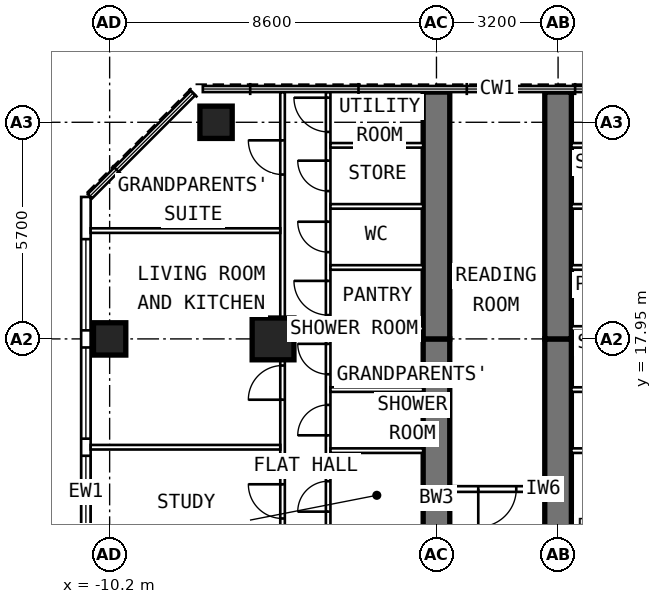
"""IFC4 building model, lengths in metres.
Left out: names, types, materials, properties, quantities, classifications, styles, units other than length and angle.
Written with IfcOpenShell. Run it as: python <this file> out.ifc"""

import sys

from ifc_helpers import new_model, si_unit, direction, frame, frame_2d, origin, origin_2d, place, context, subcontext, project, spatial, rectangle, extrude, element, fill, save


model = new_model("IFC4")
c1 = context("Model", 3, precision=1e-05, world=origin(), true_north=direction((0.0, 1.0)))
c2 = subcontext(c1, "Body", "Model", "MODEL_VIEW")
j1 = project(units=[si_unit("LENGTHUNIT", "METRE"), si_unit("PLANEANGLEUNIT", "RADIAN")], contexts=[c1])
p1 = place(None, origin())
s1 = spatial("IfcSite", under=j1, at=p1, CompositionType="ELEMENT")
p2 = place(p1, origin())
s2 = spatial("IfcBuilding", under=s1, at=p2, CompositionType="ELEMENT")
p3 = place(p2, frame((0.0, 0.0, 235.2)))
s3 = spatial("IfcBuildingStorey", under=s2, at=p3, CompositionType="ELEMENT", Elevation=235.2)
for number, where, z_axis, x_axis in (
    (1, (-10.2, 17.95, 0.0), (0.0, 0.0, 1.0), (0.0, 1.0, 0.0)),
    (2, (-7.4, 23.65, 0.0), (0.0, 0.0, 1.0), (0.0, 1.0, 0.0)),
):
    element("IfcColumn", number, at=place(p3, frame(where, z_axis=z_axis, x_axis=x_axis)), inside=s3, PredefinedType="COLUMN", context=c2, shape_type="SweptSolid", body=[
        extrude(rectangle(XDim=0.85, YDim=0.85, at=origin_2d()), origin(), (0.0, 0.0, 1.0), 3.6),
    ])
p4 = place(p3, frame((-5.9, 17.95, 0.0), z_axis=(0.0, 0.0, 1.0), x_axis=(0.0, 1.0, 0.0)))
e3 = element("IfcColumn", 3, at=p4, inside=s3, PredefinedType="COLUMN", context=c2, shape_type="SweptSolid", body=[
    extrude(rectangle(XDim=1.1, YDim=1.1, at=origin_2d()), origin(), (0.0, 0.0, 1.0), 3.6),
])
p5 = place(p3, frame((-1.6, 9.6, 0.0), z_axis=(0.0, 0.0, 1.0), x_axis=(0.0, 1.0, 0.0)))
e4 = element("IfcWall", 4, at=p5, inside=s3, PredefinedType="SHEAR", context=c2, shape_type="SweptSolid", body=[
    extrude(rectangle(XDim=8.35, YDim=0.7, at=frame_2d((4.175, 0.0))), origin(), (0.0, 0.0, 1.0), 3.6),
])
p6 = place(p5, frame((1.3, 0.0, 0.0)))
e5 = element("IfcOpeningElement", 5, at=p6, cuts=e4, PredefinedType="OPENING", context=c2, shape_type="SweptSolid", body=[
    extrude(rectangle(XDim=1.0, YDim=2.1, at=frame_2d((0.5, 1.05))), frame((0.0, 0.362, 0.0), z_axis=(0.0, -1.0, 0.0), x_axis=(1.0, 0.0, 0.0)), (0.0, 0.0, 1.0), 0.724),
])
p7 = place(p3, frame((-1.6, 17.95, 0.0), z_axis=(0.0, 0.0, 1.0), x_axis=(0.0, 1.0, 0.0)))
e6 = element("IfcWall", 6, at=p7, inside=s3, PredefinedType="SHEAR", context=c2, shape_type="SweptSolid", body=[
    extrude(rectangle(XDim=6.495, YDim=0.7, at=frame_2d((3.248, 0.0))), origin(), (0.0, 0.0, 1.0), 3.6),
])
p8 = place(p3, frame((1.6, 9.6, 0.0), z_axis=(0.0, 0.0, 1.0), x_axis=(0.0, 1.0, 0.0)))
e7 = element("IfcWall", 7, at=p8, inside=s3, PredefinedType="SHEAR", context=c2, shape_type="SweptSolid", body=[
    extrude(rectangle(XDim=8.35, YDim=0.7, at=frame_2d((4.175, 0.0))), origin(), (0.0, 0.0, 1.0), 3.6),
])
p9 = place(p8, frame((1.3, 0.0, 0.0)))
e8 = element("IfcOpeningElement", 8, at=p9, cuts=e7, PredefinedType="OPENING", context=c2, shape_type="SweptSolid", body=[
    extrude(rectangle(XDim=1.0, YDim=2.1, at=frame_2d((0.5, 1.05))), frame((0.0, 0.362, 0.0), z_axis=(0.0, -1.0, 0.0), x_axis=(1.0, 0.0, 0.0)), (0.0, 0.0, 1.0), 0.724),
])
p10 = place(p3, frame((1.6, 17.95, 0.0), z_axis=(0.0, 0.0, 1.0), x_axis=(0.0, 1.0, 0.0)))
e9 = element("IfcWall", 9, at=p10, inside=s3, PredefinedType="SHEAR", context=c2, shape_type="SweptSolid", body=[
    extrude(rectangle(XDim=6.495, YDim=0.7, at=frame_2d((3.248, 0.0))), origin(), (0.0, 0.0, 1.0), 3.6),
])
p11 = place(p3, frame((-10.825, 6.148, 0.0), z_axis=(0.0, 0.0, 1.0), x_axis=(0.0, 1.0, 0.0)))
e10 = element("IfcWall", 10, at=p11, inside=s3, PredefinedType="SOLIDWALL", context=c2, shape_type="SweptSolid", body=[
    extrude(rectangle(XDim=15.537, YDim=0.25, at=frame_2d((7.769, 0.0))), origin(), (0.0, 0.0, 1.0), 3.35),
])
p12 = place(p11, frame((0.627, 0.0, 0.8)))
e11 = element("IfcOpeningElement", 11, at=p12, cuts=e10, PredefinedType="OPENING", context=c2, shape_type="SweptSolid", body=[
    extrude(rectangle(XDim=2.4, YDim=1.8, at=frame_2d((1.2, 0.9))), frame((0.0, 0.137, 0.0), z_axis=(0.0, -1.0, 0.0), x_axis=(1.0, 0.0, 0.0)), (0.0, 0.0, 1.0), 0.274),
])
p13 = place(p11, frame((3.477, 0.0, 0.8)))
e12 = element("IfcOpeningElement", 12, at=p13, cuts=e10, PredefinedType="OPENING", context=c2, shape_type="SweptSolid", body=[
    extrude(rectangle(XDim=2.4, YDim=1.8, at=frame_2d((1.2, 0.9))), frame((0.0, 0.137, 0.0), z_axis=(0.0, -1.0, 0.0), x_axis=(1.0, 0.0, 0.0)), (0.0, 0.0, 1.0), 0.274),
])
p14 = place(p11, frame((6.327, 0.0, 0.8)))
e13 = element("IfcOpeningElement", 13, at=p14, cuts=e10, PredefinedType="OPENING", context=c2, shape_type="SweptSolid", body=[
    extrude(rectangle(XDim=2.4, YDim=1.8, at=frame_2d((1.2, 0.9))), frame((0.0, 0.137, 0.0), z_axis=(0.0, -1.0, 0.0), x_axis=(1.0, 0.0, 0.0)), (0.0, 0.0, 1.0), 0.274),
])
p15 = place(p11, frame((9.177, 0.0, 0.8)))
e14 = element("IfcOpeningElement", 14, at=p15, cuts=e10, PredefinedType="OPENING", context=c2, shape_type="SweptSolid", body=[
    extrude(rectangle(XDim=2.4, YDim=1.8, at=frame_2d((1.2, 0.9))), frame((0.0, 0.137, 0.0), z_axis=(0.0, -1.0, 0.0), x_axis=(1.0, 0.0, 0.0)), (0.0, 0.0, 1.0), 0.274),
])
p16 = place(p11, frame((12.027, 0.0, 0.8)))
e15 = element("IfcOpeningElement", 15, at=p16, cuts=e10, PredefinedType="OPENING", context=c2, shape_type="SweptSolid", body=[
    extrude(rectangle(XDim=2.4, YDim=1.8, at=frame_2d((1.2, 0.9))), frame((0.0, 0.137, 0.0), z_axis=(0.0, -1.0, 0.0), x_axis=(1.0, 0.0, 0.0)), (0.0, 0.0, 1.0), 0.274),
])
p17 = place(p3, frame((-4.45, 9.9, 0.0), z_axis=(0.0, 0.0, 1.0), x_axis=(0.0, 1.0, 0.0)))
e16 = element("IfcWall", 16, at=p17, inside=s3, PredefinedType="PARTITIONING", context=c2, shape_type="SweptSolid", body=[
    extrude(rectangle(XDim=14.545, YDim=0.12, at=frame_2d((7.272, 0.0))), origin(), (0.0, 0.0, 1.0), 3.35),
])
p18 = place(p17, frame((0.95, 0.0, 0.0)))
e17 = element("IfcOpeningElement", 17, at=p18, cuts=e16, PredefinedType="OPENING", context=c2, shape_type="SweptSolid", body=[
    extrude(rectangle(XDim=0.9, YDim=2.1, at=frame_2d((0.45, 1.05))), frame((0.0, 0.072, 0.0), z_axis=(0.0, -1.0, 0.0), x_axis=(1.0, 0.0, 0.0)), (0.0, 0.0, 1.0), 0.144),
])
p19 = place(p17, frame((3.505, 0.0, 0.0)))
e18 = element("IfcOpeningElement", 18, at=p19, cuts=e16, PredefinedType="OPENING", context=c2, shape_type="SweptSolid", body=[
    extrude(rectangle(XDim=0.8, YDim=2.1, at=frame_2d((0.4, 1.05))), frame((0.0, 0.072, 0.0), z_axis=(0.0, -1.0, 0.0), x_axis=(1.0, 0.0, 0.0)), (0.0, 0.0, 1.0), 0.144),
])
p20 = place(p17, frame((5.513, 0.0, 0.0)))
e19 = element("IfcOpeningElement", 19, at=p20, cuts=e16, PredefinedType="OPENING", context=c2, shape_type="SweptSolid", body=[
    extrude(rectangle(XDim=0.8, YDim=2.1, at=frame_2d((0.4, 1.05))), frame((0.0, 0.072, 0.0), z_axis=(0.0, -1.0, 0.0), x_axis=(1.0, 0.0, 0.0)), (0.0, 0.0, 1.0), 0.144),
])
p21 = place(p17, frame((7.12, 0.0, 0.0)))
e20 = element("IfcOpeningElement", 20, at=p21, cuts=e16, PredefinedType="OPENING", context=c2, shape_type="SweptSolid", body=[
    extrude(rectangle(XDim=0.8, YDim=2.1, at=frame_2d((0.4, 1.05))), frame((0.0, 0.072, 0.0), z_axis=(0.0, -1.0, 0.0), x_axis=(1.0, 0.0, 0.0)), (0.0, 0.0, 1.0), 0.144),
])
p22 = place(p17, frame((8.677, 0.0, 0.0)))
e21 = element("IfcOpeningElement", 21, at=p22, cuts=e16, PredefinedType="OPENING", context=c2, shape_type="SweptSolid", body=[
    extrude(rectangle(XDim=0.9, YDim=2.1, at=frame_2d((0.45, 1.05))), frame((0.0, 0.072, 0.0), z_axis=(0.0, -1.0, 0.0), x_axis=(1.0, 0.0, 0.0)), (0.0, 0.0, 1.0), 0.144),
])
p23 = place(p17, frame((10.333, 0.0, 0.0)))
e22 = element("IfcOpeningElement", 22, at=p23, cuts=e16, PredefinedType="OPENING", context=c2, shape_type="SweptSolid", body=[
    extrude(rectangle(XDim=0.8, YDim=2.1, at=frame_2d((0.4, 1.05))), frame((0.0, 0.072, 0.0), z_axis=(0.0, -1.0, 0.0), x_axis=(1.0, 0.0, 0.0)), (0.0, 0.0, 1.0), 0.144),
])
p24 = place(p17, frame((11.94, 0.0, 0.0)))
e23 = element("IfcOpeningElement", 23, at=p24, cuts=e16, PredefinedType="OPENING", context=c2, shape_type="SweptSolid", body=[
    extrude(rectangle(XDim=0.8, YDim=2.1, at=frame_2d((0.4, 1.05))), frame((0.0, 0.072, 0.0), z_axis=(0.0, -1.0, 0.0), x_axis=(1.0, 0.0, 0.0)), (0.0, 0.0, 1.0), 0.144),
])
p25 = place(p17, frame((13.497, 0.0, 0.0)))
e24 = element("IfcOpeningElement", 24, at=p25, cuts=e16, PredefinedType="OPENING", context=c2, shape_type="SweptSolid", body=[
    extrude(rectangle(XDim=0.9, YDim=2.1, at=frame_2d((0.45, 1.05))), frame((0.0, 0.072, 0.0), z_axis=(0.0, -1.0, 0.0), x_axis=(1.0, 0.0, 0.0)), (0.0, 0.0, 1.0), 0.144),
])
p26 = place(p3, frame((-5.65, 9.6, 0.0), z_axis=(0.0, 0.0, 1.0), x_axis=(0.0, 1.0, 0.0)))
e25 = element("IfcWall", 25, at=p26, inside=s3, PredefinedType="PARTITIONING", context=c2, shape_type="SweptSolid", body=[
    extrude(rectangle(XDim=14.845, YDim=0.12, at=frame_2d((7.422, 0.0))), origin(), (0.0, 0.0, 1.0), 3.35),
])
p27 = place(p26, frame((1.05, 0.0, 0.0)))
e26 = element("IfcOpeningElement", 26, at=p27, cuts=e25, PredefinedType="OPENING", context=c2, shape_type="SweptSolid", body=[
    extrude(rectangle(XDim=0.9, YDim=2.1, at=frame_2d((0.45, 1.05))), frame((0.0, 0.072, 0.0), z_axis=(0.0, -1.0, 0.0), x_axis=(1.0, 0.0, 0.0)), (0.0, 0.0, 1.0), 0.144),
])
p28 = place(p26, frame((3.625, 0.0, 0.0)))
e27 = element("IfcOpeningElement", 27, at=p28, cuts=e25, PredefinedType="OPENING", context=c2, shape_type="SweptSolid", body=[
    extrude(rectangle(XDim=0.9, YDim=2.1, at=frame_2d((0.45, 1.05))), frame((0.0, 0.072, 0.0), z_axis=(0.0, -1.0, 0.0), x_axis=(1.0, 0.0, 0.0)), (0.0, 0.0, 1.0), 0.144),
])
p29 = place(p26, frame((6.75, 0.0, 0.0)))
e28 = element("IfcOpeningElement", 28, at=p29, cuts=e25, PredefinedType="OPENING", context=c2, shape_type="SweptSolid", body=[
    extrude(rectangle(XDim=0.9, YDim=2.1, at=frame_2d((0.45, 1.05))), frame((0.0, 0.072, 0.0), z_axis=(0.0, -1.0, 0.0), x_axis=(1.0, 0.0, 0.0)), (0.0, 0.0, 1.0), 0.144),
])
p30 = place(p26, frame((12.675, 0.0, 0.0)))
e29 = element("IfcOpeningElement", 29, at=p30, cuts=e25, PredefinedType="OPENING", context=c2, shape_type="SweptSolid", body=[
    extrude(rectangle(XDim=0.9, YDim=2.1, at=frame_2d((0.45, 1.05))), frame((0.0, 0.072, 0.0), z_axis=(0.0, -1.0, 0.0), x_axis=(1.0, 0.0, 0.0)), (0.0, 0.0, 1.0), 0.144),
])
for number, where, z_axis, x_axis in (
    (30, (-5.71, 15.1, 0.0), (0.0, 0.0, 1.0), (-1.0, 0.0, 0.0)),
    (31, (-5.71, 20.8, 0.0), (0.0, 0.0, 1.0), (-1.0, 0.0, 0.0)),
):
    element("IfcWall", number, at=place(p3, frame(where, z_axis=z_axis, x_axis=x_axis)), inside=s3, PredefinedType="PARTITIONING", context=c2, shape_type="SweptSolid", body=[
        extrude(rectangle(XDim=4.99, YDim=0.12, at=frame_2d((2.495, 0.0))), origin(), (0.0, 0.0, 1.0), 3.35),
    ])
for number, where, z_axis, x_axis in (
    (32, (-1.95, 15.01, 0.0), (0.0, 0.0, 1.0), (-1.0, 0.0, 0.0)),
    (33, (-1.95, 16.617, 0.0), (0.0, 0.0, 1.0), (-1.0, 0.0, 0.0)),
):
    element("IfcWall", number, at=place(p3, frame(where, z_axis=z_axis, x_axis=x_axis)), inside=s3, PredefinedType="PARTITIONING", context=c2, shape_type="SweptSolid", body=[
        extrude(rectangle(XDim=2.44, YDim=0.12, at=frame_2d((1.22, 0.0))), origin(), (0.0, 0.0, 1.0), 3.35),
    ])
p31 = place(p3, frame((-1.95, 18.223, 0.0), z_axis=(0.0, 0.0, 1.0), x_axis=(-1.0, 0.0, 0.0)))
e34 = element("IfcWall", 34, at=p31, inside=s3, PredefinedType="PARTITIONING", context=c2, shape_type="SweptSolid", body=[
    extrude(rectangle(XDim=2.44, YDim=0.12, at=frame_2d((1.22, 0.0))), origin(), (0.0, 0.0, 1.0), 2.45),
])
for number, where, z_axis, x_axis in (
    (35, (-1.95, 19.83, 0.0), (0.0, 0.0, 1.0), (-1.0, 0.0, 0.0)),
    (36, (-1.95, 21.437, 0.0), (0.0, 0.0, 1.0), (-1.0, 0.0, 0.0)),
    (37, (-1.95, 23.043, 0.0), (0.0, 0.0, 1.0), (-1.0, 0.0, 0.0)),
    (38, (1.95, 15.01, 0.0), (0.0, 0.0, 1.0), (1.0, 0.0, 0.0)),
    (39, (1.95, 16.617, 0.0), (0.0, 0.0, 1.0), (1.0, 0.0, 0.0)),
):
    element("IfcWall", number, at=place(p3, frame(where, z_axis=z_axis, x_axis=x_axis)), inside=s3, PredefinedType="PARTITIONING", context=c2, shape_type="SweptSolid", body=[
        extrude(rectangle(XDim=2.44, YDim=0.12, at=frame_2d((1.22, 0.0))), origin(), (0.0, 0.0, 1.0), 3.35),
    ])
p32 = place(p3, frame((1.95, 18.223, 0.0), z_axis=(0.0, 0.0, 1.0), x_axis=(1.0, 0.0, 0.0)))
e40 = element("IfcWall", 40, at=p32, inside=s3, PredefinedType="PARTITIONING", context=c2, shape_type="SweptSolid", body=[
    extrude(rectangle(XDim=2.44, YDim=0.12, at=frame_2d((1.22, 0.0))), origin(), (0.0, 0.0, 1.0), 2.45),
])
for number, where, z_axis, x_axis in (
    (41, (1.95, 19.83, 0.0), (0.0, 0.0, 1.0), (1.0, 0.0, 0.0)),
    (42, (1.95, 21.437, 0.0), (0.0, 0.0, 1.0), (1.0, 0.0, 0.0)),
    (43, (1.95, 23.043, 0.0), (0.0, 0.0, 1.0), (1.0, 0.0, 0.0)),
):
    element("IfcWall", number, at=place(p3, frame(where, z_axis=z_axis, x_axis=x_axis)), inside=s3, PredefinedType="PARTITIONING", context=c2, shape_type="SweptSolid", body=[
        extrude(rectangle(XDim=2.44, YDim=0.12, at=frame_2d((1.22, 0.0))), origin(), (0.0, 0.0, 1.0), 3.35),
    ])
p33 = place(p3, frame((1.25, 14.0, 0.0), z_axis=(0.0, 0.0, 1.0), x_axis=(-1.0, 0.0, 0.0)))
e44 = element("IfcWall", 44, at=p33, inside=s3, PredefinedType="PARTITIONING", context=c2, shape_type="SweptSolid", body=[
    extrude(rectangle(XDim=2.5, YDim=0.15, at=frame_2d((1.25, 0.0))), origin(), (0.0, 0.0, 1.0), 3.35),
])
p34 = place(p33, frame((0.75, 0.0, 0.0)))
e45 = element("IfcOpeningElement", 45, at=p34, cuts=e44, PredefinedType="OPENING", context=c2, shape_type="SweptSolid", body=[
    extrude(rectangle(XDim=1.0, YDim=2.1, at=frame_2d((0.5, 1.05))), frame((0.0, 0.087, 0.0), z_axis=(0.0, -1.0, 0.0), x_axis=(1.0, 0.0, 0.0)), (0.0, 0.0, 1.0), 0.174),
])
p35 = place(p14, origin())
e46 = element("IfcWindow", 46, at=p35, inside=s3, PartitioningType="SINGLE_PANEL", PredefinedType="WINDOW", context=c2, shape_type="SweptSolid", body=[
    extrude(rectangle(XDim=2.4, YDim=1.8, at=frame_2d((1.2, 0.9))), frame((0.0, 0.03, 0.0), z_axis=(0.0, -1.0, 0.0), x_axis=(1.0, 0.0, 0.0)), (0.0, 0.0, 1.0), 0.06),
])
fill(e13, e46)
p36 = place(p15, origin())
e47 = element("IfcWindow", 47, at=p36, inside=s3, PartitioningType="SINGLE_PANEL", PredefinedType="WINDOW", context=c2, shape_type="SweptSolid", body=[
    extrude(rectangle(XDim=2.4, YDim=1.8, at=frame_2d((1.2, 0.9))), frame((0.0, 0.03, 0.0), z_axis=(0.0, -1.0, 0.0), x_axis=(1.0, 0.0, 0.0)), (0.0, 0.0, 1.0), 0.06),
])
fill(e14, e47)
p37 = place(p16, origin())
e48 = element("IfcWindow", 48, at=p37, inside=s3, PartitioningType="SINGLE_PANEL", PredefinedType="WINDOW", context=c2, shape_type="SweptSolid", body=[
    extrude(rectangle(XDim=2.4, YDim=1.8, at=frame_2d((1.2, 0.9))), frame((0.0, 0.03, 0.0), z_axis=(0.0, -1.0, 0.0), x_axis=(1.0, 0.0, 0.0)), (0.0, 0.0, 1.0), 0.06),
])
fill(e15, e48)
p38 = place(p28, origin())
e49 = element("IfcDoor", 49, at=p38, inside=s3, OperationType="SINGLE_SWING_RIGHT", PredefinedType="DOOR", context=c2, shape_type="SweptSolid", body=[
    extrude(rectangle(XDim=0.9, YDim=2.1, at=frame_2d((0.45, 1.05))), frame((0.0, 0.025, 0.0), z_axis=(0.0, -1.0, 0.0), x_axis=(1.0, 0.0, 0.0)), (0.0, 0.0, 1.0), 0.05),
])
fill(e27, e49)
p39 = place(p29, origin())
e50 = element("IfcDoor", 50, at=p39, inside=s3, OperationType="SINGLE_SWING_LEFT", PredefinedType="DOOR", context=c2, shape_type="SweptSolid", body=[
    extrude(rectangle(XDim=0.9, YDim=2.1, at=frame_2d((0.45, 1.05))), frame((0.0, 0.025, 0.0), z_axis=(0.0, -1.0, 0.0), x_axis=(1.0, 0.0, 0.0)), (0.0, 0.0, 1.0), 0.05),
])
fill(e28, e50)
p40 = place(p30, origin())
e51 = element("IfcDoor", 51, at=p40, inside=s3, OperationType="SINGLE_SWING_RIGHT", PredefinedType="DOOR", context=c2, shape_type="SweptSolid", body=[
    extrude(rectangle(XDim=0.9, YDim=2.1, at=frame_2d((0.45, 1.05))), frame((0.0, 0.025, 0.0), z_axis=(0.0, -1.0, 0.0), x_axis=(1.0, 0.0, 0.0)), (0.0, 0.0, 1.0), 0.05),
])
fill(e29, e51)
p41 = place(p19, origin())
e52 = element("IfcDoor", 52, at=p41, inside=s3, OperationType="SINGLE_SWING_LEFT", PredefinedType="DOOR", context=c2, shape_type="SweptSolid", body=[
    extrude(rectangle(XDim=0.8, YDim=2.1, at=frame_2d((0.4, 1.05))), frame((0.0, 0.025, 0.0), z_axis=(0.0, -1.0, 0.0), x_axis=(1.0, 0.0, 0.0)), (0.0, 0.0, 1.0), 0.05),
])
fill(e18, e52)
p42 = place(p20, origin())
e53 = element("IfcDoor", 53, at=p42, inside=s3, OperationType="SINGLE_SWING_LEFT", PredefinedType="DOOR", context=c2, shape_type="SweptSolid", body=[
    extrude(rectangle(XDim=0.8, YDim=2.1, at=frame_2d((0.4, 1.05))), frame((0.0, 0.025, 0.0), z_axis=(0.0, -1.0, 0.0), x_axis=(1.0, 0.0, 0.0)), (0.0, 0.0, 1.0), 0.05),
])
fill(e19, e53)
p43 = place(p21, origin())
e54 = element("IfcDoor", 54, at=p43, inside=s3, OperationType="SINGLE_SWING_RIGHT", PredefinedType="DOOR", context=c2, shape_type="SweptSolid", body=[
    extrude(rectangle(XDim=0.8, YDim=2.1, at=frame_2d((0.4, 1.05))), frame((0.0, 0.025, 0.0), z_axis=(0.0, -1.0, 0.0), x_axis=(1.0, 0.0, 0.0)), (0.0, 0.0, 1.0), 0.05),
])
fill(e20, e54)
p44 = place(p22, origin())
e55 = element("IfcDoor", 55, at=p44, inside=s3, OperationType="SINGLE_SWING_RIGHT", PredefinedType="DOOR", context=c2, shape_type="SweptSolid", body=[
    extrude(rectangle(XDim=0.9, YDim=2.1, at=frame_2d((0.45, 1.05))), frame((0.0, 0.025, 0.0), z_axis=(0.0, -1.0, 0.0), x_axis=(1.0, 0.0, 0.0)), (0.0, 0.0, 1.0), 0.05),
])
fill(e21, e55)
p45 = place(p23, origin())
e56 = element("IfcDoor", 56, at=p45, inside=s3, OperationType="SINGLE_SWING_RIGHT", PredefinedType="DOOR", context=c2, shape_type="SweptSolid", body=[
    extrude(rectangle(XDim=0.8, YDim=2.1, at=frame_2d((0.4, 1.05))), frame((0.0, 0.025, 0.0), z_axis=(0.0, -1.0, 0.0), x_axis=(1.0, 0.0, 0.0)), (0.0, 0.0, 1.0), 0.05),
])
fill(e22, e56)
p46 = place(p24, origin())
e57 = element("IfcDoor", 57, at=p46, inside=s3, OperationType="SINGLE_SWING_RIGHT", PredefinedType="DOOR", context=c2, shape_type="SweptSolid", body=[
    extrude(rectangle(XDim=0.8, YDim=2.1, at=frame_2d((0.4, 1.05))), frame((0.0, 0.025, 0.0), z_axis=(0.0, -1.0, 0.0), x_axis=(1.0, 0.0, 0.0)), (0.0, 0.0, 1.0), 0.05),
])
fill(e23, e57)
p47 = place(p25, origin())
e58 = element("IfcDoor", 58, at=p47, inside=s3, OperationType="SINGLE_SWING_RIGHT", PredefinedType="DOOR", context=c2, shape_type="SweptSolid", body=[
    extrude(rectangle(XDim=0.9, YDim=2.1, at=frame_2d((0.45, 1.05))), frame((0.0, 0.025, 0.0), z_axis=(0.0, -1.0, 0.0), x_axis=(1.0, 0.0, 0.0)), (0.0, 0.0, 1.0), 0.05),
])
fill(e24, e58)
p48 = place(p34, origin())
e59 = element("IfcDoor", 59, at=p48, inside=s3, OperationType="SINGLE_SWING_RIGHT", PredefinedType="DOOR", context=c2, shape_type="SweptSolid", body=[
    extrude(rectangle(XDim=1.0, YDim=2.1, at=frame_2d((0.5, 1.05))), frame((0.0, 0.025, 0.0), z_axis=(0.0, -1.0, 0.0), x_axis=(1.0, 0.0, 0.0)), (0.0, 0.0, 1.0), 0.05),
])
fill(e45, e59)
save(model, sys.argv[1])
